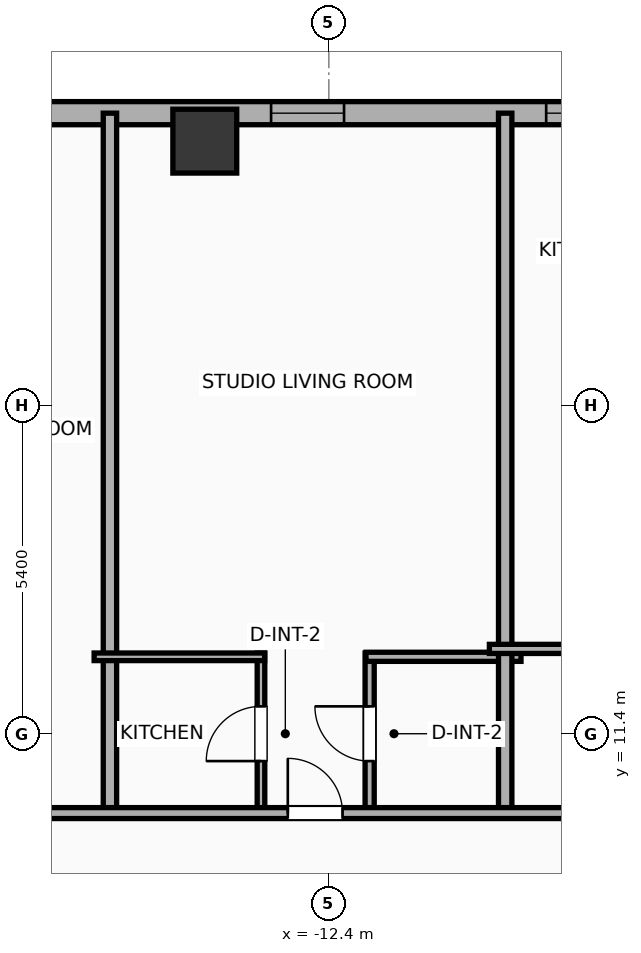
"""IFC4 building model, lengths in metres.
Left out: names, types, materials, properties, quantities, classifications, styles, units other than length and angle.
Written with IfcOpenShell. Run it as: python <this file> out.ifc"""

import sys

from ifc_helpers import new_model, si_unit, direction, frame, frame_2d, origin, origin_2d, place, context, subcontext, project, spatial, rectangle, hollow_rectangle, extrude, element, fill, save


model = new_model("IFC4")
c1 = context("Model", 3, precision=1e-05, world=origin(), true_north=direction((0.0, 1.0)))
c2 = subcontext(c1, "Body", "Model", "MODEL_VIEW")
j1 = project(units=[si_unit("LENGTHUNIT", "METRE"), si_unit("PLANEANGLEUNIT", "RADIAN")], contexts=[c1])
p1 = place(None, origin())
s1 = spatial("IfcSite", under=j1, at=p1, CompositionType="ELEMENT")
p2 = place(p1, origin())
s2 = spatial("IfcBuilding", under=s1, at=p2, CompositionType="ELEMENT")
p3 = place(p2, frame((0.0, 0.0, 128.7)))
s3 = spatial("IfcBuildingStorey", under=s2, at=p3, CompositionType="ELEMENT", Elevation=128.7)
p4 = place(p3, frame((-14.44, 21.15, 0.0), z_axis=(0.0, 0.0, 1.0), x_axis=(1.0, 0.0, 0.0)))
e1 = element("IfcColumn", 1, at=p4, inside=s3, PredefinedType="COLUMN", context=c2, shape_type="SweptSolid", body=[
    extrude(hollow_rectangle(XDim=1.05, YDim=1.05, WallThickness=0.036, at=origin_2d()), origin(), (0.0, 0.0, 1.0), 3.9),
])
p5 = place(p3, frame((-25.381, 21.61, 0.0), z_axis=(0.0, 0.0, 1.0), x_axis=(1.0, 0.0, 0.0)))
e2 = element("IfcWall", 2, at=p5, inside=s3, PredefinedType="ELEMENTEDWALL", context=c2, shape_type="SweptSolid", body=[
    extrude(rectangle(XDim=54.763, YDim=0.38, at=frame_2d((27.381, 0.0))), origin(), (0.0, 0.0, 1.0), 3.65),
])
p6 = place(p5, frame((5.645, 0.0, 0.75)))
e3 = element("IfcOpeningElement", 3, at=p6, cuts=e2, PredefinedType="OPENING", context=c2, shape_type="SweptSolid", body=[
    extrude(rectangle(XDim=2.4, YDim=2.1, at=frame_2d((1.2, 1.05))), frame((0.0, 0.2, 0.0), z_axis=(0.0, -1.0, 0.0), x_axis=(1.0, 0.0, 0.0)), (0.0, 0.0, 1.0), 0.4),
])
p7 = place(p5, frame((45.067, 0.0, 0.75)))
e4 = element("IfcOpeningElement", 4, at=p7, cuts=e2, PredefinedType="OPENING", context=c2, shape_type="SweptSolid", body=[
    extrude(rectangle(XDim=2.4, YDim=2.1, at=frame_2d((1.2, 1.05))), frame((0.0, 0.2, 0.0), z_axis=(0.0, -1.0, 0.0), x_axis=(1.0, 0.0, 0.0)), (0.0, 0.0, 1.0), 0.4),
])
p8 = place(p5, frame((1.286, 0.0, 0.75)))
e5 = element("IfcOpeningElement", 5, at=p8, cuts=e2, PredefinedType="OPENING", context=c2, shape_type="SweptSolid", body=[
    extrude(rectangle(XDim=1.2, YDim=2.05, at=frame_2d((0.6, 1.025))), frame((0.0, 0.2, 0.0), z_axis=(0.0, -1.0, 0.0), x_axis=(1.0, 0.0, 0.0)), (0.0, 0.0, 1.0), 0.4),
])
p9 = place(p5, frame((3.501, 0.0, 0.75)))
e6 = element("IfcOpeningElement", 6, at=p9, cuts=e2, PredefinedType="OPENING", context=c2, shape_type="SweptSolid", body=[
    extrude(rectangle(XDim=1.2, YDim=2.05, at=frame_2d((0.6, 1.025))), frame((0.0, 0.2, 0.0), z_axis=(0.0, -1.0, 0.0), x_axis=(1.0, 0.0, 0.0)), (0.0, 0.0, 1.0), 0.4),
])
p10 = place(p5, frame((12.031, 0.0, 0.75)))
e7 = element("IfcOpeningElement", 7, at=p10, cuts=e2, PredefinedType="OPENING", context=c2, shape_type="SweptSolid", body=[
    extrude(rectangle(XDim=1.2, YDim=2.05, at=frame_2d((0.6, 1.025))), frame((0.0, 0.2, 0.0), z_axis=(0.0, -1.0, 0.0), x_axis=(1.0, 0.0, 0.0)), (0.0, 0.0, 1.0), 0.4),
])
p11 = place(p5, frame((19.805, 0.0, 0.75)))
e8 = element("IfcOpeningElement", 8, at=p11, cuts=e2, PredefinedType="OPENING", context=c2, shape_type="SweptSolid", body=[
    extrude(rectangle(XDim=1.2, YDim=2.05, at=frame_2d((0.6, 1.025))), frame((0.0, 0.2, 0.0), z_axis=(0.0, -1.0, 0.0), x_axis=(1.0, 0.0, 0.0)), (0.0, 0.0, 1.0), 0.4),
])
p12 = place(p5, frame((16.555, 0.0, 0.75)))
e9 = element("IfcOpeningElement", 9, at=p12, cuts=e2, PredefinedType="OPENING", context=c2, shape_type="SweptSolid", body=[
    extrude(rectangle(XDim=1.2, YDim=2.05, at=frame_2d((0.6, 1.025))), frame((0.0, 0.2, 0.0), z_axis=(0.0, -1.0, 0.0), x_axis=(1.0, 0.0, 0.0)), (0.0, 0.0, 1.0), 0.4),
])
p13 = place(p5, frame((23.866, 0.0, 0.75)))
e10 = element("IfcOpeningElement", 10, at=p13, cuts=e2, PredefinedType="OPENING", context=c2, shape_type="SweptSolid", body=[
    extrude(rectangle(XDim=1.2, YDim=2.05, at=frame_2d((0.6, 1.025))), frame((0.0, 0.2, 0.0), z_axis=(0.0, -1.0, 0.0), x_axis=(1.0, 0.0, 0.0)), (0.0, 0.0, 1.0), 0.4),
])
p14 = place(p5, frame((27.116, 0.0, 0.75)))
e11 = element("IfcOpeningElement", 11, at=p14, cuts=e2, PredefinedType="OPENING", context=c2, shape_type="SweptSolid", body=[
    extrude(rectangle(XDim=1.2, YDim=2.05, at=frame_2d((0.6, 1.025))), frame((0.0, 0.2, 0.0), z_axis=(0.0, -1.0, 0.0), x_axis=(1.0, 0.0, 0.0)), (0.0, 0.0, 1.0), 0.4),
])
p15 = place(p5, frame((30.931, 0.0, 0.75)))
e12 = element("IfcOpeningElement", 12, at=p15, cuts=e2, PredefinedType="OPENING", context=c2, shape_type="SweptSolid", body=[
    extrude(rectangle(XDim=1.2, YDim=2.05, at=frame_2d((0.6, 1.025))), frame((0.0, 0.2, 0.0), z_axis=(0.0, -1.0, 0.0), x_axis=(1.0, 0.0, 0.0)), (0.0, 0.0, 1.0), 0.4),
])
p16 = place(p5, frame((36.811, 0.0, 0.75)))
e13 = element("IfcOpeningElement", 13, at=p16, cuts=e2, PredefinedType="OPENING", context=c2, shape_type="SweptSolid", body=[
    extrude(rectangle(XDim=1.2, YDim=2.05, at=frame_2d((0.6, 1.025))), frame((0.0, 0.2, 0.0), z_axis=(0.0, -1.0, 0.0), x_axis=(1.0, 0.0, 0.0)), (0.0, 0.0, 1.0), 0.4),
])
p17 = place(p5, frame((40.061, 0.0, 0.75)))
e14 = element("IfcOpeningElement", 14, at=p17, cuts=e2, PredefinedType="OPENING", context=c2, shape_type="SweptSolid", body=[
    extrude(rectangle(XDim=1.2, YDim=2.05, at=frame_2d((0.6, 1.025))), frame((0.0, 0.2, 0.0), z_axis=(0.0, -1.0, 0.0), x_axis=(1.0, 0.0, 0.0)), (0.0, 0.0, 1.0), 0.4),
])
p18 = place(p5, frame((50.527, 0.0, 0.75)))
e15 = element("IfcOpeningElement", 15, at=p18, cuts=e2, PredefinedType="OPENING", context=c2, shape_type="SweptSolid", body=[
    extrude(rectangle(XDim=1.2, YDim=2.05, at=frame_2d((0.6, 1.025))), frame((0.0, 0.2, 0.0), z_axis=(0.0, -1.0, 0.0), x_axis=(1.0, 0.0, 0.0)), (0.0, 0.0, 1.0), 0.4),
])
p19 = place(p3, frame((-16.0, 10.02, 0.0), z_axis=(0.0, 0.0, 1.0), x_axis=(0.0, 1.0, 0.0)))
e16 = element("IfcWall", 16, at=p19, inside=s3, PredefinedType="PARTITIONING", context=c2, shape_type="SweptSolid", body=[
    extrude(rectangle(XDim=11.59, YDim=0.22, at=frame_2d((5.795, 0.0))), origin(), (0.0, 0.0, 1.0), 3.65),
])
p20 = place(p3, frame((-13.516, 10.08, 0.0), z_axis=(0.0, 0.0, 1.0), x_axis=(0.0, 1.0, 0.0)))
e17 = element("IfcWall", 17, at=p20, inside=s3, PredefinedType="PARTITIONING", context=c2, shape_type="SweptSolid", body=[
    extrude(rectangle(XDim=2.65, YDim=0.125, at=frame_2d((1.325, 0.0))), origin(), (0.0, 0.0, 1.0), 3.65),
])
p21 = place(p20, frame((0.875, 0.0, 0.0)))
e18 = element("IfcOpeningElement", 18, at=p21, cuts=e17, PredefinedType="OPENING", context=c2, shape_type="SweptSolid", body=[
    extrude(rectangle(XDim=0.9, YDim=2.05, at=frame_2d((0.45, 1.025))), frame((0.0, 0.073, 0.0), z_axis=(0.0, -1.0, 0.0), x_axis=(1.0, 0.0, 0.0)), (0.0, 0.0, 1.0), 0.145),
])
p22 = place(p3, frame((-11.729, 10.08, 0.0), z_axis=(0.0, 0.0, 1.0), x_axis=(0.0, 1.0, 0.0)))
e19 = element("IfcWall", 19, at=p22, inside=s3, PredefinedType="PLUMBINGWALL", context=c2, shape_type="SweptSolid", body=[
    extrude(rectangle(XDim=2.65, YDim=0.15, at=frame_2d((1.325, 0.0))), origin(), (0.0, 0.0, 1.0), 3.65),
])
p23 = place(p22, frame((0.875, 0.0, 0.0)))
e20 = element("IfcOpeningElement", 20, at=p23, cuts=e19, PredefinedType="OPENING", context=c2, shape_type="SweptSolid", body=[
    extrude(rectangle(XDim=0.9, YDim=2.05, at=frame_2d((0.45, 1.025))), frame((0.0, 0.085, 0.0), z_axis=(0.0, -1.0, 0.0), x_axis=(1.0, 0.0, 0.0)), (0.0, 0.0, 1.0), 0.17),
])
p24 = place(p3, frame((-16.26, 12.67, 0.0), z_axis=(0.0, 0.0, 1.0), x_axis=(1.0, 0.0, 0.0)))
e21 = element("IfcWall", 21, at=p24, inside=s3, PredefinedType="PARTITIONING", context=c2, shape_type="SweptSolid", body=[
    extrude(rectangle(XDim=2.804, YDim=0.125, at=frame_2d((1.402, 0.0))), origin(), (0.0, 0.0, 1.0), 3.65),
])
p25 = place(p3, frame((-11.789, 12.67, 0.0), z_axis=(0.0, 0.0, 1.0), x_axis=(1.0, 0.0, 0.0)))
e22 = element("IfcWall", 22, at=p25, inside=s3, PredefinedType="PLUMBINGWALL", context=c2, shape_type="SweptSolid", body=[
    extrude(rectangle(XDim=2.549, YDim=0.15, at=frame_2d((1.274, 0.0))), origin(), (0.0, 0.0, 1.0), 3.65),
])
p26 = place(p3, frame((-9.5, 10.02, 0.0), z_axis=(0.0, 0.0, 1.0), x_axis=(0.0, 1.0, 0.0)))
e23 = element("IfcWall", 23, at=p26, inside=s3, PredefinedType="PARTITIONING", context=c2, shape_type="SweptSolid", body=[
    extrude(rectangle(XDim=11.59, YDim=0.22, at=frame_2d((5.795, 0.0))), origin(), (0.0, 0.0, 1.0), 3.65),
])
p27 = place(p3, frame((-9.76, 12.8, 0.0), z_axis=(0.0, 0.0, 1.0), x_axis=(1.0, 0.0, 0.0)))
e24 = element("IfcWall", 24, at=p27, inside=s3, PredefinedType="PLUMBINGWALL", context=c2, shape_type="SweptSolid", body=[
    extrude(rectangle(XDim=2.888, YDim=0.15, at=frame_2d((1.444, 0.0))), origin(), (0.0, 0.0, 1.0), 3.65),
])
p28 = place(p3, frame((-29.21, 10.1, 0.0), z_axis=(0.0, 0.0, 1.0), x_axis=(1.0, 0.0, 0.0)))
e25 = element("IfcWall", 25, at=p28, inside=s3, PredefinedType="PARTITIONING", context=c2, shape_type="SweptSolid", body=[
    extrude(rectangle(XDim=62.42, YDim=0.18, at=frame_2d((31.21, 0.0))), origin(), (0.0, 0.0, 1.0), 3.65),
])
p29 = place(p28, frame((3.033, 0.0, 0.0)))
e26 = element("IfcOpeningElement", 26, at=p29, cuts=e25, PredefinedType="OPENING", context=c2, shape_type="SweptSolid", body=[
    extrude(rectangle(XDim=0.9, YDim=2.05, at=frame_2d((0.45, 1.025))), frame((0.0, 0.1, 0.0), z_axis=(0.0, -1.0, 0.0), x_axis=(1.0, 0.0, 0.0)), (0.0, 0.0, 1.0), 0.2),
])
p30 = place(p28, frame((10.573, 0.0, 0.0)))
e27 = element("IfcOpeningElement", 27, at=p30, cuts=e25, PredefinedType="OPENING", context=c2, shape_type="SweptSolid", body=[
    extrude(rectangle(XDim=1.15, YDim=2.05, at=frame_2d((0.575, 1.025))), frame((0.0, 0.1, 0.0), z_axis=(0.0, -1.0, 0.0), x_axis=(1.0, 0.0, 0.0)), (0.0, 0.0, 1.0), 0.2),
])
p31 = place(p28, frame((16.135, 0.0, 0.0)))
e28 = element("IfcOpeningElement", 28, at=p31, cuts=e25, PredefinedType="OPENING", context=c2, shape_type="SweptSolid", body=[
    extrude(rectangle(XDim=0.9, YDim=2.05, at=frame_2d((0.45, 1.025))), frame((0.0, 0.1, 0.0), z_axis=(0.0, -1.0, 0.0), x_axis=(1.0, 0.0, 0.0)), (0.0, 0.0, 1.0), 0.2),
])
p32 = place(p28, frame((23.632, 0.0, 0.0)))
e29 = element("IfcOpeningElement", 29, at=p32, cuts=e25, PredefinedType="OPENING", context=c2, shape_type="SweptSolid", body=[
    extrude(rectangle(XDim=1.15, YDim=2.05, at=frame_2d((0.575, 1.025))), frame((0.0, 0.1, 0.0), z_axis=(0.0, -1.0, 0.0), x_axis=(1.0, 0.0, 0.0)), (0.0, 0.0, 1.0), 0.2),
])
p33 = place(p28, frame((27.751, 0.0, 0.0)))
e30 = element("IfcOpeningElement", 30, at=p33, cuts=e25, PredefinedType="OPENING", context=c2, shape_type="SweptSolid", body=[
    extrude(rectangle(XDim=1.15, YDim=2.05, at=frame_2d((0.575, 1.025))), frame((0.0, 0.1, 0.0), z_axis=(0.0, -1.0, 0.0), x_axis=(1.0, 0.0, 0.0)), (0.0, 0.0, 1.0), 0.2),
])
p34 = place(p28, frame((35.635, 0.0, 0.0)))
e31 = element("IfcOpeningElement", 31, at=p34, cuts=e25, PredefinedType="OPENING", context=c2, shape_type="SweptSolid", body=[
    extrude(rectangle(XDim=0.9, YDim=2.05, at=frame_2d((0.45, 1.025))), frame((0.0, 0.1, 0.0), z_axis=(0.0, -1.0, 0.0), x_axis=(1.0, 0.0, 0.0)), (0.0, 0.0, 1.0), 0.2),
])
p35 = place(p28, frame((40.697, 0.0, 0.0)))
e32 = element("IfcOpeningElement", 32, at=p35, cuts=e25, PredefinedType="OPENING", context=c2, shape_type="SweptSolid", body=[
    extrude(rectangle(XDim=1.15, YDim=2.05, at=frame_2d((0.575, 1.025))), frame((0.0, 0.1, 0.0), z_axis=(0.0, -1.0, 0.0), x_axis=(1.0, 0.0, 0.0)), (0.0, 0.0, 1.0), 0.2),
])
p36 = place(p28, frame((48.637, 0.0, 0.0)))
e33 = element("IfcOpeningElement", 33, at=p36, cuts=e25, PredefinedType="OPENING", context=c2, shape_type="SweptSolid", body=[
    extrude(rectangle(XDim=0.9, YDim=2.05, at=frame_2d((0.45, 1.025))), frame((0.0, 0.1, 0.0), z_axis=(0.0, -1.0, 0.0), x_axis=(1.0, 0.0, 0.0)), (0.0, 0.0, 1.0), 0.2),
])
p37 = place(p28, frame((57.213, 0.0, 0.0)))
e34 = element("IfcOpeningElement", 34, at=p37, cuts=e25, PredefinedType="OPENING", context=c2, shape_type="SweptSolid", body=[
    extrude(rectangle(XDim=1.15, YDim=2.05, at=frame_2d((0.575, 1.025))), frame((0.0, 0.1, 0.0), z_axis=(0.0, -1.0, 0.0), x_axis=(1.0, 0.0, 0.0)), (0.0, 0.0, 1.0), 0.2),
])
p38 = place(p10, origin())
e35 = element("IfcWindow", 35, at=p38, inside=s3, PartitioningType="SINGLE_PANEL", PredefinedType="WINDOW", context=c2, shape_type="SweptSolid", body=[
    extrude(rectangle(XDim=1.2, YDim=2.05, at=frame_2d((0.6, 1.025))), frame((0.0, 0.03, 0.0), z_axis=(0.0, -1.0, 0.0), x_axis=(1.0, 0.0, 0.0)), (0.0, 0.0, 1.0), 0.06),
])
fill(e7, e35)
p39 = place(p12, origin())
e36 = element("IfcWindow", 36, at=p39, inside=s3, PartitioningType="SINGLE_PANEL", PredefinedType="WINDOW", context=c2, shape_type="SweptSolid", body=[
    extrude(rectangle(XDim=1.2, YDim=2.05, at=frame_2d((0.6, 1.025))), frame((0.0, 0.03, 0.0), z_axis=(0.0, -1.0, 0.0), x_axis=(1.0, 0.0, 0.0)), (0.0, 0.0, 1.0), 0.06),
])
fill(e9, e36)
p40 = place(p21, origin())
e37 = element("IfcDoor", 37, at=p40, inside=s3, OperationType="SINGLE_SWING_LEFT", PredefinedType="DOOR", context=c2, shape_type="SweptSolid", body=[
    extrude(rectangle(XDim=0.9, YDim=2.05, at=frame_2d((0.45, 1.025))), frame((0.0, 0.025, 0.0), z_axis=(0.0, -1.0, 0.0), x_axis=(1.0, 0.0, 0.0)), (0.0, 0.0, 1.0), 0.05),
])
fill(e18, e37)
p41 = place(p23, origin())
e38 = element("IfcDoor", 38, at=p41, inside=s3, OperationType="SINGLE_SWING_RIGHT", PredefinedType="DOOR", context=c2, shape_type="SweptSolid", body=[
    extrude(rectangle(XDim=0.9, YDim=2.05, at=frame_2d((0.45, 1.025))), frame((0.0, 0.025, 0.0), z_axis=(0.0, -1.0, 0.0), x_axis=(1.0, 0.0, 0.0)), (0.0, 0.0, 1.0), 0.05),
])
fill(e20, e38)
p42 = place(p31, origin())
e39 = element("IfcDoor", 39, at=p42, inside=s3, OperationType="SINGLE_SWING_LEFT", PredefinedType="DOOR", context=c2, shape_type="SweptSolid", body=[
    extrude(rectangle(XDim=0.9, YDim=2.05, at=frame_2d((0.45, 1.025))), frame((0.0, 0.025, 0.0), z_axis=(0.0, -1.0, 0.0), x_axis=(1.0, 0.0, 0.0)), (0.0, 0.0, 1.0), 0.05),
])
fill(e28, e39)
save(model, sys.argv[1])
